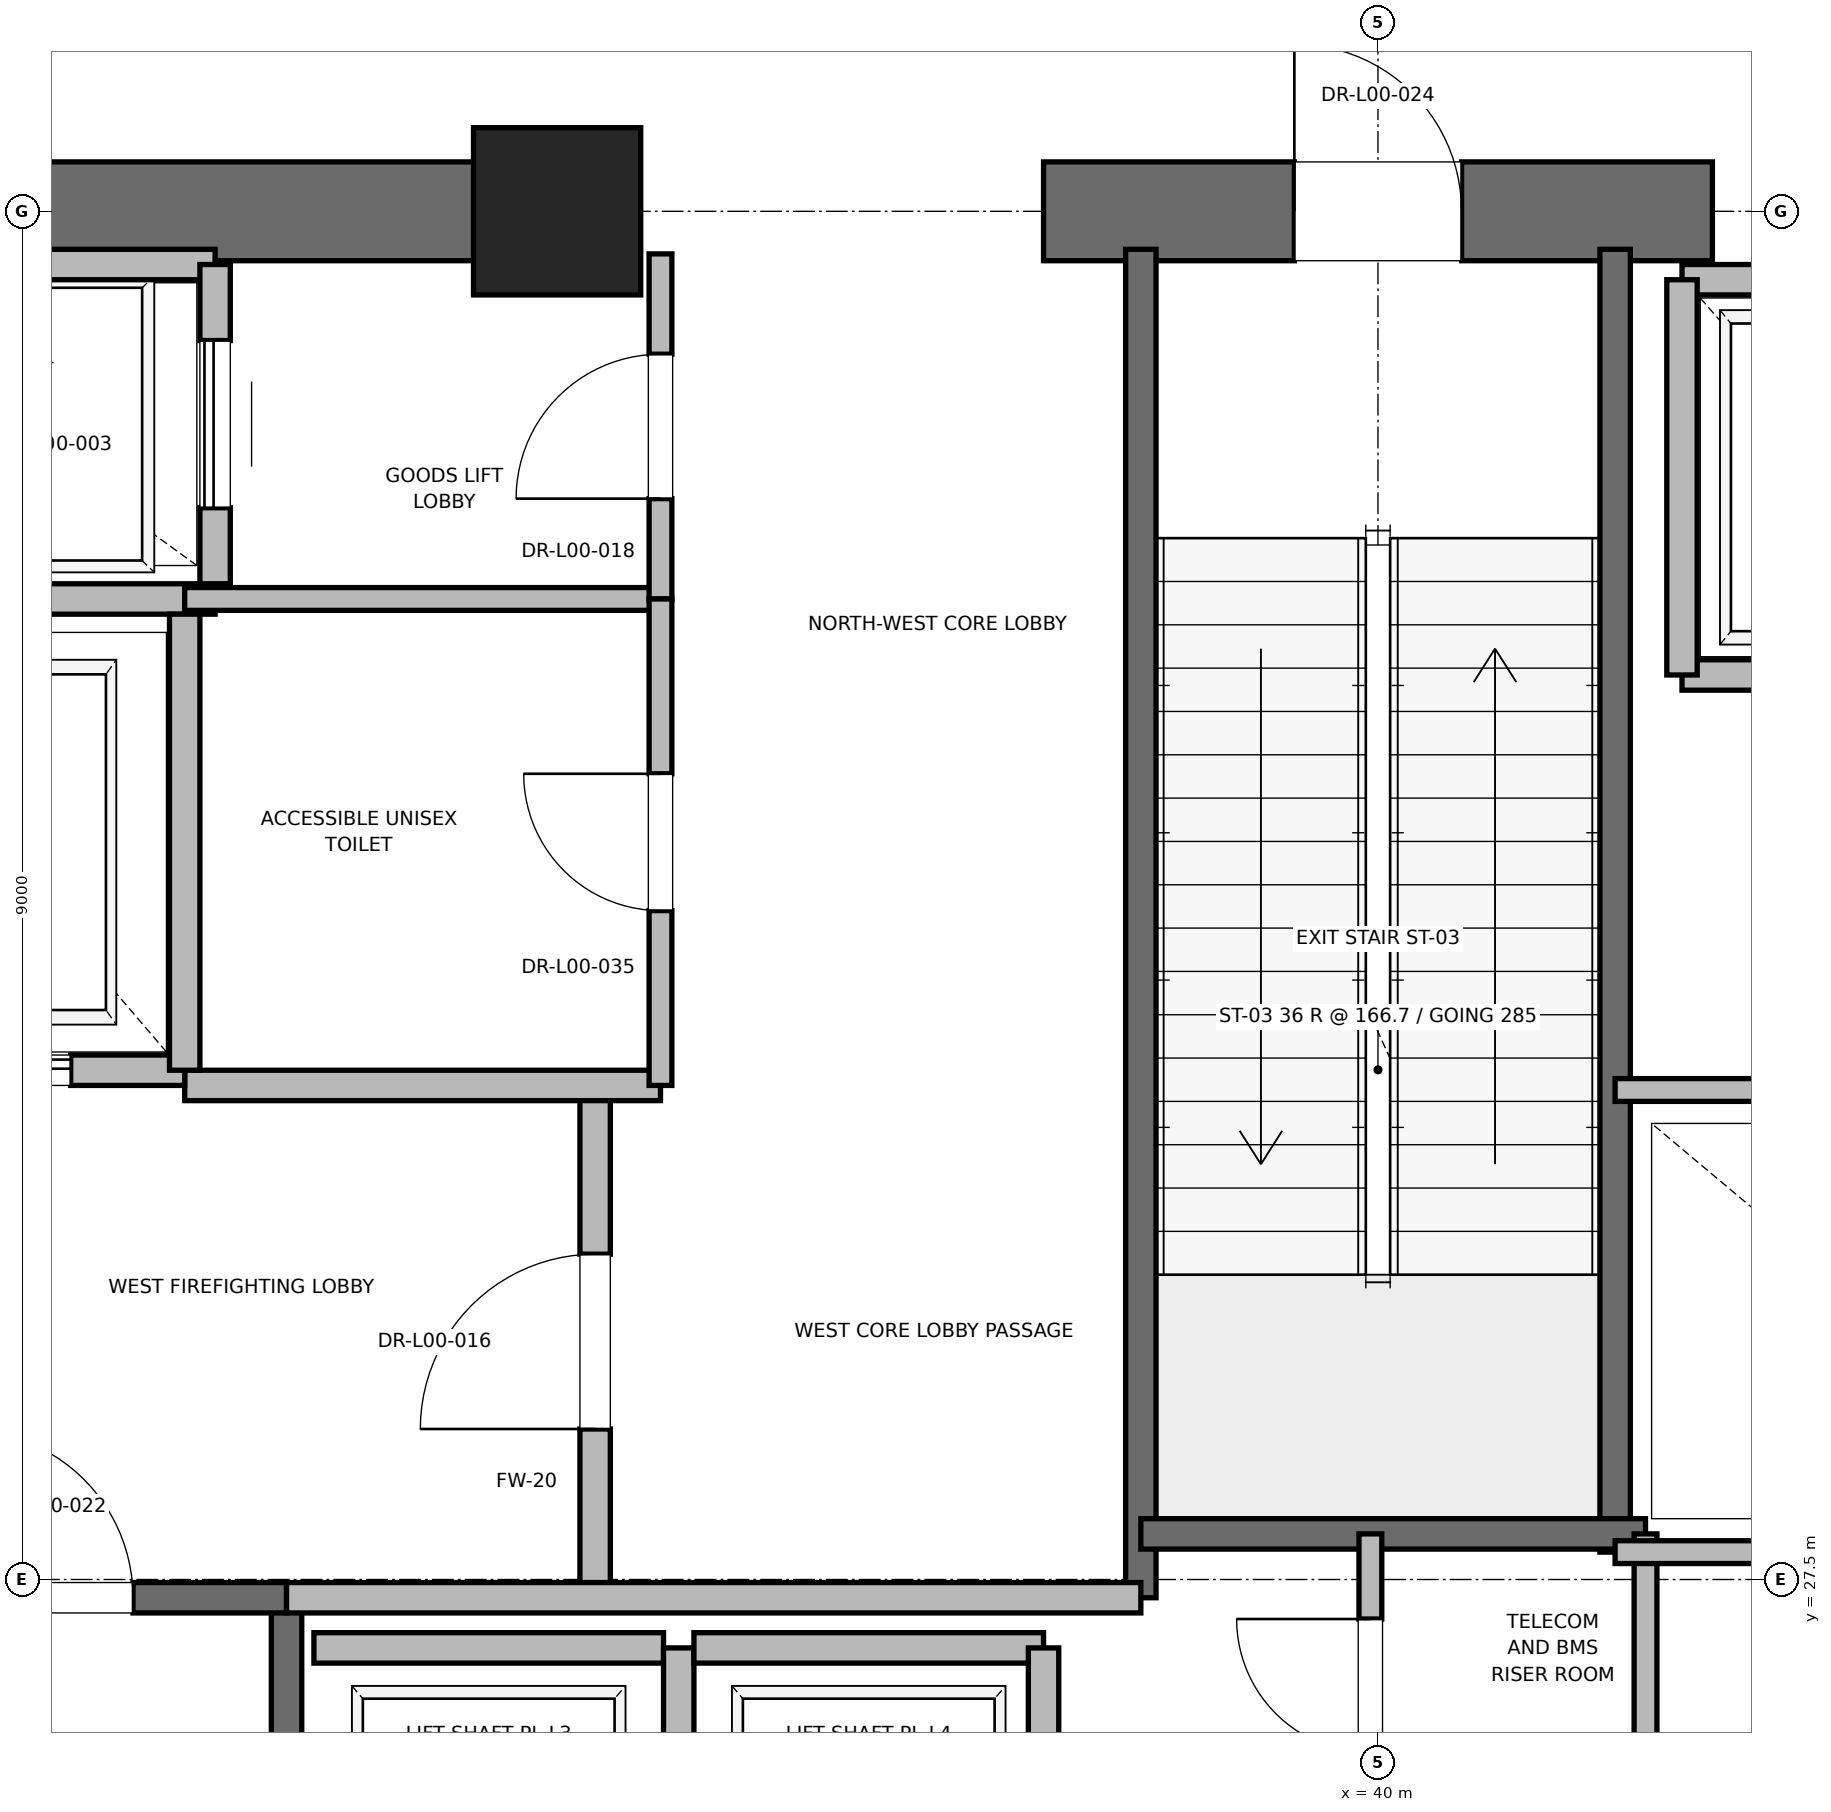
"""IFC4 building model, lengths in metres.
Left out: names, types, materials, properties, quantities, classifications, styles, units other than length and angle.
Written with IfcOpenShell. Run it as: python <this file> out.ifc"""

import sys

from ifc_helpers import new_model, si_unit, direction, frame, frame_2d, origin, origin_2d, place, context, subcontext, project, spatial, rectangle, extrude, element, fill, save


model = new_model("IFC4")
c1 = context("Model", 3, precision=1e-05, world=origin(), true_north=direction((0.0, 1.0)))
c2 = subcontext(c1, "Body", "Model", "MODEL_VIEW")
j1 = project(units=[si_unit("LENGTHUNIT", "METRE"), si_unit("PLANEANGLEUNIT", "RADIAN")], contexts=[c1])
p1 = place(None, origin())
s1 = spatial("IfcSite", under=j1, at=p1, CompositionType="ELEMENT")
p2 = place(p1, origin())
s2 = spatial("IfcBuilding", under=s1, at=p2, CompositionType="ELEMENT")
p3 = place(p2, origin())
s3 = spatial("IfcBuildingStorey", under=s2, at=p3, CompositionType="ELEMENT", Elevation=0.0)
p4 = place(p3, frame((34.6, 36.5, 0.0), z_axis=(0.0, 0.0, 1.0), x_axis=(1.0, 0.0, 0.0)))
e1 = element("IfcColumn", 1, at=p4, inside=s3, PredefinedType="PILASTER", context=c2, shape_type="SweptSolid", body=[
    extrude(rectangle(XDim=1.1, YDim=1.1, at=origin_2d()), origin(), (0.0, 0.0, 1.0), 6.0),
])
p5 = place(p3, frame((29.0, 36.5, 0.0), z_axis=(0.0, 0.0, 1.0), x_axis=(1.0, 0.0, 0.0)))
e2 = element("IfcWall", 2, at=p5, inside=s3, PredefinedType="SHEAR", context=c2, shape_type="SweptSolid", body=[
    extrude(rectangle(XDim=5.8, YDim=0.65, at=frame_2d((2.9, 0.0))), origin(), (0.0, 0.0, 1.0), 5.72),
])
p6 = place(p3, frame((37.8, 36.5, 0.0), z_axis=(0.0, 0.0, 1.0), x_axis=(1.0, 0.0, 0.0)))
e3 = element("IfcWall", 3, at=p6, inside=s3, PredefinedType="SHEAR", context=c2, shape_type="SweptSolid", body=[
    extrude(rectangle(XDim=4.4, YDim=0.65, at=frame_2d((2.2, 0.0))), origin(), (0.0, 0.0, 1.0), 5.72),
])
p7 = place(p6, frame((1.65, 0.0, 0.0)))
e4 = element("IfcOpeningElement", 4, at=p7, cuts=e3, PredefinedType="OPENING", context=c2, shape_type="SweptSolid", body=[
    extrude(rectangle(XDim=1.1, YDim=2.15, at=frame_2d((0.55, 1.075))), frame((0.0, 0.325, 0.0), z_axis=(0.0, -1.0, 0.0), x_axis=(1.0, 0.0, 0.0)), (0.0, 0.0, 1.0), 0.65),
])
p8 = place(p3, frame((32.82, 18.6, 0.0), z_axis=(0.0, 0.0, 1.0), x_axis=(0.0, 1.0, 0.0)))
e5 = element("IfcWall", 5, at=p8, inside=s3, PredefinedType="SOLIDWALL", context=c2, shape_type="SweptSolid", body=[
    extrude(rectangle(XDim=8.78, YDim=0.2, at=frame_2d((4.39, 0.0))), origin(), (0.0, 0.0, 1.0), 5.72),
])
p9 = place(p3, frame((29.7, 27.38, 0.0), z_axis=(0.0, 0.0, 1.0), x_axis=(1.0, 0.0, 0.0)))
e6 = element("IfcWall", 6, at=p9, inside=s3, PredefinedType="SOLIDWALL", context=c2, shape_type="SweptSolid", body=[
    extrude(rectangle(XDim=3.12, YDim=0.2, at=frame_2d((1.56, 0.0))), origin(), (0.0, 0.0, 1.0), 5.72),
])
p10 = place(p9, frame((1.01, 0.0, 0.0)))
e7 = element("IfcOpeningElement", 7, at=p10, cuts=e6, PredefinedType="OPENING", context=c2, shape_type="SweptSolid", body=[
    extrude(rectangle(XDim=1.1, YDim=2.15, at=frame_2d((0.55, 1.075))), frame((0.0, 0.1, 0.0), z_axis=(0.0, -1.0, 0.0), x_axis=(1.0, 0.0, 0.0)), (0.0, 0.0, 1.0), 0.2),
])
p11 = place(p3, frame((38.44, 27.38, 0.0), z_axis=(0.0, 0.0, 1.0), x_axis=(0.0, 1.0, 0.0)))
e8 = element("IfcWall", 8, at=p11, inside=s3, PredefinedType="SOLIDWALL", context=c2, shape_type="SweptSolid", body=[
    extrude(rectangle(XDim=8.87, YDim=0.2, at=frame_2d((4.435, 0.0))), origin(), (0.0, 0.0, 1.0), 5.72),
])
p12 = place(p3, frame((41.56, 27.68, 0.0), z_axis=(0.0, 0.0, 1.0), x_axis=(0.0, 1.0, 0.0)))
e9 = element("IfcWall", 9, at=p12, inside=s3, PredefinedType="SOLIDWALL", context=c2, shape_type="SweptSolid", body=[
    extrude(rectangle(XDim=8.57, YDim=0.2, at=frame_2d((4.285, 0.0))), origin(), (0.0, 0.0, 1.0), 5.72),
])
p13 = place(p3, frame((38.44, 27.8, 0.0), z_axis=(0.0, 0.0, 1.0), x_axis=(1.0, 0.0, 0.0)))
e10 = element("IfcWall", 10, at=p13, inside=s3, PredefinedType="SOLIDWALL", context=c2, shape_type="SweptSolid", body=[
    extrude(rectangle(XDim=3.32, YDim=0.2, at=frame_2d((1.66, 0.0))), origin(), (0.0, 0.0, 1.0), 5.72),
])
p14 = place(p3, frame((34.85, 27.38, 0.0), z_axis=(0.0, 0.0, 1.0), x_axis=(0.0, 1.0, 0.0)))
e11 = element("IfcWall", 11, at=p14, inside=s3, PredefinedType="PARTITIONING", context=c2, shape_type="SweptSolid", body=[
    extrude(rectangle(XDim=3.37, YDim=0.2, at=frame_2d((1.685, 0.0))), origin(), (0.0, 0.0, 1.0), 5.72),
])
p15 = place(p14, frame((1.11, 0.0, 0.0)))
e12 = element("IfcOpeningElement", 12, at=p15, cuts=e11, PredefinedType="OPENING", context=c2, shape_type="SweptSolid", body=[
    extrude(rectangle(XDim=1.15, YDim=2.2, at=frame_2d((0.575, 1.1))), frame((0.0, 0.1, 0.0), z_axis=(0.0, -1.0, 0.0), x_axis=(1.0, 0.0, 0.0)), (0.0, 0.0, 1.0), 0.2),
])
p16 = place(p3, frame((32.82, 27.38, 0.0), z_axis=(0.0, 0.0, 1.0), x_axis=(1.0, 0.0, 0.0)))
e13 = element("IfcWall", 13, at=p16, inside=s3, PredefinedType="PARTITIONING", context=c2, shape_type="SweptSolid", body=[
    extrude(rectangle(XDim=5.62, YDim=0.2, at=frame_2d((2.81, 0.0))), origin(), (0.0, 0.0, 1.0), 5.72),
])
p17 = place(p3, frame((32.15, 30.75, 0.0), z_axis=(0.0, 0.0, 1.0), x_axis=(1.0, 0.0, 0.0)))
e14 = element("IfcWall", 14, at=p17, inside=s3, PredefinedType="PARTITIONING", context=c2, shape_type="SweptSolid", body=[
    extrude(rectangle(XDim=3.13, YDim=0.2, at=frame_2d((1.565, 0.0))), origin(), (0.0, 0.0, 1.0), 5.72),
])
p18 = place(p3, frame((29.55, 30.85, 0.0), z_axis=(0.0, 0.0, 1.0), x_axis=(1.0, 0.0, 0.0)))
e15 = element("IfcWall", 15, at=p18, inside=s3, PredefinedType="SOLIDWALL", context=c2, shape_type="SweptSolid", body=[
    extrude(rectangle(XDim=2.6, YDim=0.2, at=frame_2d((1.3, 0.0))), origin(), (0.0, 0.0, 1.0), 4.5),
])
p19 = place(p18, frame((0.75, 0.0, 0.0)))
e16 = element("IfcOpeningElement", 16, at=p19, cuts=e15, PredefinedType="OPENING", context=c2, shape_type="SweptSolid", body=[
    extrude(rectangle(XDim=1.1, YDim=2.2, at=frame_2d((0.55, 1.1))), frame((0.0, 0.1, 0.0), z_axis=(0.0, -1.0, 0.0), x_axis=(1.0, 0.0, 0.0)), (0.0, 0.0, 1.0), 0.2),
])
p20 = place(p3, frame((29.55, 33.95, 0.0), z_axis=(0.0, 0.0, 1.0), x_axis=(1.0, 0.0, 0.0)))
e17 = element("IfcWall", 17, at=p20, inside=s3, PredefinedType="SOLIDWALL", context=c2, shape_type="SweptSolid", body=[
    extrude(rectangle(XDim=2.8, YDim=0.2, at=frame_2d((1.4, 0.0))), origin(), (0.0, 0.0, 1.0), 5.72),
])
p21 = place(p3, frame((32.15, 30.85, 0.0), z_axis=(0.0, 0.0, 1.0), x_axis=(0.0, 1.0, 0.0)))
e18 = element("IfcWall", 18, at=p21, inside=s3, PredefinedType="SOLIDWALL", context=c2, shape_type="SweptSolid", body=[
    extrude(rectangle(XDim=3.0, YDim=0.2, at=frame_2d((1.5, 0.0))), origin(), (0.0, 0.0, 1.0), 5.72),
])
p22 = place(p3, frame((32.35, 36.15, 0.0), z_axis=(0.0, 0.0, 1.0), x_axis=(-1.0, 0.0, 0.0)))
e19 = element("IfcWall", 19, at=p22, inside=s3, PredefinedType="SOLIDWALL", context=c2, shape_type="SweptSolid", body=[
    extrude(rectangle(XDim=2.8, YDim=0.2, at=frame_2d((1.4, 0.0))), origin(), (0.0, 0.0, 1.0), 4.779),
])
p23 = place(p3, frame((32.35, 34.05, 0.0), z_axis=(0.0, 0.0, 1.0), x_axis=(0.0, 1.0, 0.0)))
e20 = element("IfcWall", 20, at=p23, inside=s3, PredefinedType="SOLIDWALL", context=c2, shape_type="SweptSolid", body=[
    extrude(rectangle(XDim=2.1, YDim=0.2, at=frame_2d((1.05, 0.0))), origin(), (0.0, 0.0, 1.0), 5.72),
])
p24 = place(p23, frame((0.5, 0.0, 0.0)))
e21 = element("IfcOpeningElement", 21, at=p24, cuts=e20, PredefinedType="OPENING", context=c2, shape_type="SweptSolid", body=[
    extrude(rectangle(XDim=1.1, YDim=2.2, at=frame_2d((0.55, 1.1))), frame((0.0, 0.1, 0.0), z_axis=(0.0, -1.0, 0.0), x_axis=(1.0, 0.0, 0.0)), (0.0, 0.0, 1.0), 0.2),
])
p25 = place(p3, frame((35.3, 27.05, 0.0), z_axis=(0.0, 0.0, 1.0), x_axis=(-1.0, 0.0, 0.0)))
e22 = element("IfcWall", 22, at=p25, inside=s3, PredefinedType="SOLIDWALL", context=c2, shape_type="SweptSolid", body=[
    extrude(rectangle(XDim=2.3, YDim=0.2, at=frame_2d((1.15, 0.0))), origin(), (0.0, 0.0, 1.0), 5.72),
])
p26 = place(p3, frame((35.4, 24.45, 0.0), z_axis=(0.0, 0.0, 1.0), x_axis=(0.0, 1.0, 0.0)))
e23 = element("IfcWall", 23, at=p26, inside=s3, PredefinedType="SOLIDWALL", context=c2, shape_type="SweptSolid", body=[
    extrude(rectangle(XDim=2.6, YDim=0.2, at=frame_2d((1.3, 0.0))), origin(), (0.0, 0.0, 1.0), 5.72),
])
p27 = place(p3, frame((37.8, 27.05, 0.0), z_axis=(0.0, 0.0, 1.0), x_axis=(-1.0, 0.0, 0.0)))
e24 = element("IfcWall", 24, at=p27, inside=s3, PredefinedType="SOLIDWALL", context=c2, shape_type="SweptSolid", body=[
    extrude(rectangle(XDim=2.3, YDim=0.2, at=frame_2d((1.15, 0.0))), origin(), (0.0, 0.0, 1.0), 5.72),
])
p28 = place(p3, frame((37.8, 24.45, 0.0), z_axis=(0.0, 0.0, 1.0), x_axis=(0.0, 1.0, 0.0)))
e25 = element("IfcWall", 25, at=p28, inside=s3, PredefinedType="SOLIDWALL", context=c2, shape_type="SweptSolid", body=[
    extrude(rectangle(XDim=2.6, YDim=0.2, at=frame_2d((1.3, 0.0))), origin(), (0.0, 0.0, 1.0), 5.72),
])
p29 = place(p3, frame((42.0, 33.45, 0.0), z_axis=(0.0, 0.0, 1.0), x_axis=(1.0, 0.0, 0.0)))
e26 = element("IfcWall", 26, at=p29, inside=s3, PredefinedType="SOLIDWALL", context=c2, shape_type="SweptSolid", body=[
    extrude(rectangle(XDim=2.3, YDim=0.2, at=frame_2d((1.15, 0.0))), origin(), (0.0, 0.0, 1.0), 5.72),
])
p30 = place(p29, frame((0.6, 0.0, 0.0)))
e27 = element("IfcOpeningElement", 27, at=p30, cuts=e26, PredefinedType="OPENING", context=c2, shape_type="SweptSolid", body=[
    extrude(rectangle(XDim=1.1, YDim=2.2, at=frame_2d((0.55, 1.1))), frame((0.0, 0.1, 0.0), z_axis=(0.0, -1.0, 0.0), x_axis=(1.0, 0.0, 0.0)), (0.0, 0.0, 1.0), 0.2),
])
p31 = place(p3, frame((44.3, 36.05, 0.0), z_axis=(0.0, 0.0, 1.0), x_axis=(-1.0, 0.0, 0.0)))
e28 = element("IfcWall", 28, at=p31, inside=s3, PredefinedType="SOLIDWALL", context=c2, shape_type="SweptSolid", body=[
    extrude(rectangle(XDim=2.3, YDim=0.2, at=frame_2d((1.15, 0.0))), origin(), (0.0, 0.0, 1.0), 4.5),
])
p32 = place(p3, frame((42.0, 36.05, 0.0), z_axis=(0.0, 0.0, 1.0), x_axis=(0.0, -1.0, 0.0)))
e29 = element("IfcWall", 29, at=p32, inside=s3, PredefinedType="SOLIDWALL", context=c2, shape_type="SweptSolid", body=[
    extrude(rectangle(XDim=2.6, YDim=0.2, at=frame_2d((1.3, 0.0))), origin(), (0.0, 0.0, 1.0), 4.5),
])
p33 = place(p3, frame((41.76, 23.8, 0.0), z_axis=(0.0, 0.0, 1.0), x_axis=(0.0, 1.0, 0.0)))
e30 = element("IfcWall", 30, at=p33, inside=s3, PredefinedType="PARTITIONING", context=c2, shape_type="SweptSolid", body=[
    extrude(rectangle(XDim=4.0, YDim=0.15, at=frame_2d((2.0, 0.0))), origin(), (0.0, 0.0, 1.0), 2.85),
])
p34 = place(p3, frame((39.95, 25.8, 0.0), z_axis=(0.0, 0.0, 1.0), x_axis=(0.0, 1.0, 0.0)))
e31 = element("IfcWall", 31, at=p34, inside=s3, PredefinedType="PARTITIONING", context=c2, shape_type="SweptSolid", body=[
    extrude(rectangle(XDim=2.0, YDim=0.15, at=frame_2d((1.0, 0.0))), origin(), (0.0, 0.0, 1.0), 2.85),
])
p35 = place(p34, frame((0.56, 0.0, 0.0)))
e32 = element("IfcOpeningElement", 32, at=p35, cuts=e31, PredefinedType="OPENING", context=c2, shape_type="SweptSolid", body=[
    extrude(rectangle(XDim=0.88, YDim=2.1, at=frame_2d((0.44, 1.05))), frame((0.0, 0.075, 0.0), z_axis=(0.0, -1.0, 0.0), x_axis=(1.0, 0.0, 0.0)), (0.0, 0.0, 1.0), 0.15),
])
p36 = place(p3, frame((32.15, 33.95, 0.0), z_axis=(0.0, 0.0, 1.0), x_axis=(1.0, 0.0, 0.0)))
e33 = element("IfcWall", 33, at=p36, inside=s3, PredefinedType="PARTITIONING", context=c2, shape_type="SweptSolid", body=[
    extrude(rectangle(XDim=3.13, YDim=0.15, at=frame_2d((1.565, 0.0))), origin(), (0.0, 0.0, 1.0), 2.85),
])
p37 = place(p3, frame((35.28, 33.95, 0.0), z_axis=(0.0, 0.0, 1.0), x_axis=(0.0, 1.0, 0.0)))
e34 = element("IfcWall", 34, at=p37, inside=s3, PredefinedType="PARTITIONING", context=c2, shape_type="SweptSolid", body=[
    extrude(rectangle(XDim=2.27, YDim=0.15, at=frame_2d((1.135, 0.0))), origin(), (0.0, 0.0, 1.0), 2.85),
])
p38 = place(p37, frame((0.66, 0.0, 0.0)))
e35 = element("IfcOpeningElement", 35, at=p38, cuts=e34, PredefinedType="OPENING", context=c2, shape_type="SweptSolid", body=[
    extrude(rectangle(XDim=0.95, YDim=2.15, at=frame_2d((0.475, 1.075))), frame((0.0, 0.075, 0.0), z_axis=(0.0, -1.0, 0.0), x_axis=(1.0, 0.0, 0.0)), (0.0, 0.0, 1.0), 0.15),
])
p39 = place(p3, frame((35.28, 30.75, 0.0), z_axis=(0.0, 0.0, 1.0), x_axis=(0.0, 1.0, 0.0)))
e36 = element("IfcWall", 36, at=p39, inside=s3, PredefinedType="PARTITIONING", context=c2, shape_type="SweptSolid", body=[
    extrude(rectangle(XDim=3.2, YDim=0.15, at=frame_2d((1.6, 0.0))), origin(), (0.0, 0.0, 1.0), 2.85),
])
p40 = place(p39, frame((1.15, 0.0, 0.0)))
e37 = element("IfcOpeningElement", 37, at=p40, cuts=e36, PredefinedType="OPENING", context=c2, shape_type="SweptSolid", body=[
    extrude(rectangle(XDim=0.9, YDim=2.1, at=frame_2d((0.45, 1.05))), frame((0.0, 0.075, 0.0), z_axis=(0.0, -1.0, 0.0), x_axis=(1.0, 0.0, 0.0)), (0.0, 0.0, 1.0), 0.15),
])
p41 = place(p3, frame((41.56, 27.68, 0.0), z_axis=(0.0, 0.0, 1.0), x_axis=(1.0, 0.0, 0.0)))
e38 = element("IfcWall", 38, at=p41, inside=s3, PredefinedType="PARTITIONING", context=c2, shape_type="SweptSolid", body=[
    extrude(rectangle(XDim=3.59, YDim=0.15, at=frame_2d((1.795, 0.0))), origin(), (0.0, 0.0, 1.0), 2.85),
])
p42 = place(p3, frame((41.56, 30.72, 0.0), z_axis=(0.0, 0.0, 1.0), x_axis=(1.0, 0.0, 0.0)))
e39 = element("IfcWall", 39, at=p42, inside=s3, PredefinedType="PARTITIONING", context=c2, shape_type="SweptSolid", body=[
    extrude(rectangle(XDim=3.59, YDim=0.15, at=frame_2d((1.795, 0.0))), origin(), (0.0, 0.0, 1.0), 2.85),
])
p43 = place(p42, frame((1.355, 0.0, 0.0)))
e40 = element("IfcOpeningElement", 40, at=p43, cuts=e39, PredefinedType="OPENING", context=c2, shape_type="SweptSolid", body=[
    extrude(rectangle(XDim=0.88, YDim=2.1, at=frame_2d((0.44, 1.05))), frame((0.0, 0.075, 0.0), z_axis=(0.0, -1.0, 0.0), x_axis=(1.0, 0.0, 0.0)), (0.0, 0.0, 1.0), 0.15),
])
p44 = place(p10, origin())
e41 = element("IfcDoor", 41, at=p44, inside=s3, OperationType="SINGLE_SWING_LEFT", PredefinedType="DOOR", context=c2, shape_type="SweptSolid", body=[
    extrude(rectangle(XDim=1.1, YDim=2.15, at=frame_2d((0.55, 1.075))), frame((0.0, 0.025, 0.0), z_axis=(0.0, -1.0, 0.0), x_axis=(1.0, 0.0, 0.0)), (0.0, 0.0, 1.0), 0.05),
])
fill(e7, e41)
p45 = place(p7, origin())
e42 = element("IfcDoor", 42, at=p45, inside=s3, OperationType="SINGLE_SWING_LEFT", PredefinedType="DOOR", context=c2, shape_type="SweptSolid", body=[
    extrude(rectangle(XDim=1.1, YDim=2.15, at=frame_2d((0.55, 1.075))), frame((0.0, 0.025, 0.0), z_axis=(0.0, -1.0, 0.0), x_axis=(1.0, 0.0, 0.0)), (0.0, 0.0, 1.0), 0.05),
])
fill(e4, e42)
p46 = place(p15, origin())
e43 = element("IfcDoor", 43, at=p46, inside=s3, OperationType="SINGLE_SWING_LEFT", PredefinedType="DOOR", context=c2, shape_type="SweptSolid", body=[
    extrude(rectangle(XDim=1.15, YDim=2.2, at=frame_2d((0.575, 1.1))), frame((0.0, 0.025, 0.0), z_axis=(0.0, -1.0, 0.0), x_axis=(1.0, 0.0, 0.0)), (0.0, 0.0, 1.0), 0.05),
])
fill(e12, e43)
p47 = place(p19, origin())
e44 = element("IfcDoor", 44, at=p47, inside=s3, OperationType="SLIDING_TO_RIGHT", PredefinedType="DOOR", context=c2, shape_type="SweptSolid", body=[
    extrude(rectangle(XDim=1.1, YDim=2.2, at=frame_2d((0.55, 1.1))), frame((0.0, 0.025, 0.0), z_axis=(0.0, -1.0, 0.0), x_axis=(1.0, 0.0, 0.0)), (0.0, 0.0, 1.0), 0.05),
])
fill(e16, e44)
p48 = place(p24, origin())
e45 = element("IfcDoor", 45, at=p48, inside=s3, OperationType="SLIDING_TO_RIGHT", PredefinedType="DOOR", context=c2, shape_type="SweptSolid", body=[
    extrude(rectangle(XDim=1.1, YDim=2.2, at=frame_2d((0.55, 1.1))), frame((0.0, 0.025, 0.0), z_axis=(0.0, -1.0, 0.0), x_axis=(1.0, 0.0, 0.0)), (0.0, 0.0, 1.0), 0.05),
])
fill(e21, e45)
p49 = place(p35, origin())
e46 = element("IfcDoor", 46, at=p49, inside=s3, OperationType="SINGLE_SWING_RIGHT", PredefinedType="DOOR", context=c2, shape_type="SweptSolid", body=[
    extrude(rectangle(XDim=0.88, YDim=2.1, at=frame_2d((0.44, 1.05))), frame((0.0, 0.025, 0.0), z_axis=(0.0, -1.0, 0.0), x_axis=(1.0, 0.0, 0.0)), (0.0, 0.0, 1.0), 0.05),
])
fill(e32, e46)
p50 = place(p38, origin())
e47 = element("IfcDoor", 47, at=p50, inside=s3, OperationType="SINGLE_SWING_LEFT", PredefinedType="DOOR", context=c2, shape_type="SweptSolid", body=[
    extrude(rectangle(XDim=0.95, YDim=2.15, at=frame_2d((0.475, 1.075))), frame((0.0, 0.025, 0.0), z_axis=(0.0, -1.0, 0.0), x_axis=(1.0, 0.0, 0.0)), (0.0, 0.0, 1.0), 0.05),
])
fill(e35, e47)
p51 = place(p40, origin())
e48 = element("IfcDoor", 48, at=p51, inside=s3, OperationType="SINGLE_SWING_RIGHT", PredefinedType="DOOR", context=c2, shape_type="SweptSolid", body=[
    extrude(rectangle(XDim=0.9, YDim=2.1, at=frame_2d((0.45, 1.05))), frame((0.0, 0.025, 0.0), z_axis=(0.0, -1.0, 0.0), x_axis=(1.0, 0.0, 0.0)), (0.0, 0.0, 1.0), 0.05),
])
fill(e37, e48)
save(model, sys.argv[1])
